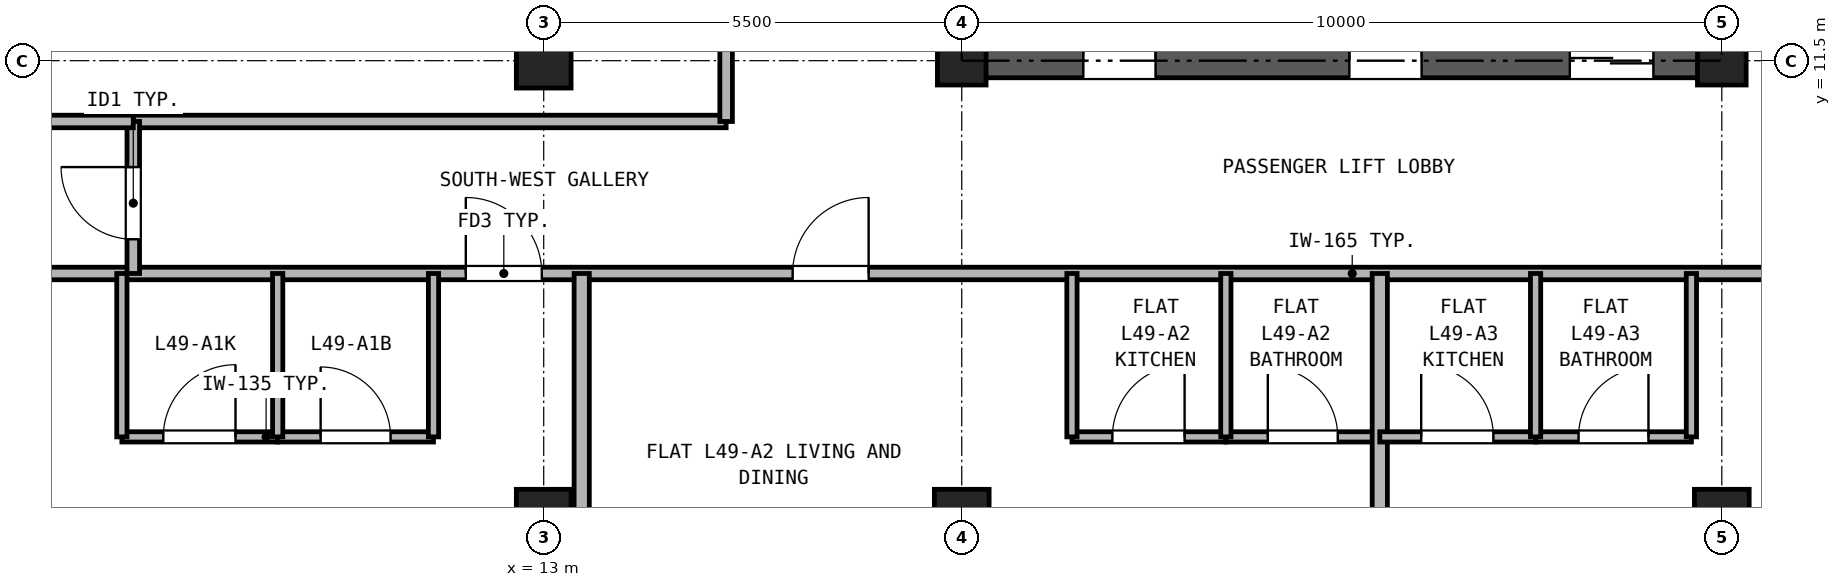
"""IFC4 building model, lengths in metres.
Left out: names, types, materials, properties, quantities, classifications, styles, units other than length and angle.
Written with IfcOpenShell. Run it as: python <this file> out.ifc"""

import sys

from ifc_helpers import new_model, si_unit, direction, frame, frame_2d, origin, origin_2d, place, context, subcontext, project, spatial, rectangle, hollow_rectangle, extrude, source, transform, mapped, element, fill, save


model = new_model("IFC4")
c1 = context("Model", 3, precision=1e-05, world=origin(), true_north=direction((0.0, 1.0)))
c2 = subcontext(c1, "Body", "Model", "MODEL_VIEW")
j1 = project(units=[si_unit("LENGTHUNIT", "METRE"), si_unit("PLANEANGLEUNIT", "RADIAN")], contexts=[c1])
p1 = place(None, origin())
s1 = spatial("IfcSite", under=j1, at=p1, CompositionType="ELEMENT")
p2 = place(p1, origin())
s2 = spatial("IfcBuilding", under=s1, at=p2, CompositionType="ELEMENT")
p3 = place(p2, frame((0.0, 0.0, 175.3)))
s3 = spatial("IfcBuildingStorey", under=s2, at=p3, CompositionType="ELEMENT", Elevation=175.3)
m1 = source(origin(), c2, "Body", "SweptSolid", [
    extrude(hollow_rectangle(XDim=0.72, YDim=0.72, WallThickness=0.04, at=origin_2d()), origin(), (0.0, 0.0, 1.0), 2.95),
])
for number, where, z_axis, x_axis in (
    (1, (13.0, 5.5, 0.0), (0.0, 0.0, 1.0), (1.0, 0.0, 0.0)),
    (2, (13.0, 11.5, 0.0), (0.0, 0.0, 1.0), (1.0, 0.0, 0.0)),
    (3, (18.5, 5.5, 0.0), (0.0, 0.0, 1.0), (1.0, 0.0, 0.0)),
):
    element("IfcColumn", number, at=place(p3, frame(where, z_axis=z_axis, x_axis=x_axis)), inside=s3, PredefinedType="COLUMN", context=c2, shape_type="MappedRepresentation", body=[
        mapped(m1, transform((0.0, 0.0, 0.0), x_axis=(1.0, 0.0, 0.0), y_axis=(0.0, 1.0, 0.0), z_axis=(0.0, 0.0, 1.0), scale=1.0)),
    ])
m2 = source(origin(), c2, "Body", "SweptSolid", [
    extrude(hollow_rectangle(XDim=0.64, YDim=0.64, WallThickness=0.035, at=origin_2d()), origin(), (0.0, 0.0, 1.0), 2.95),
])
p4 = place(p3, frame((18.5, 11.5, 0.0), z_axis=(0.0, 0.0, 1.0), x_axis=(1.0, 0.0, 0.0)))
e4 = element("IfcColumn", 4, at=p4, inside=s3, PredefinedType="COLUMN", context=c2, shape_type="MappedRepresentation", body=[
    mapped(m2, transform((0.0, 0.0, 0.0), x_axis=(1.0, 0.0, 0.0), y_axis=(0.0, 1.0, 0.0), z_axis=(0.0, 0.0, 1.0), scale=1.0)),
])
p5 = place(p3, frame((28.5, 5.5, 0.0), z_axis=(0.0, 0.0, 1.0), x_axis=(1.0, 0.0, 0.0)))
e5 = element("IfcColumn", 5, at=p5, inside=s3, PredefinedType="COLUMN", context=c2, shape_type="MappedRepresentation", body=[
    mapped(m1, transform((0.0, 0.0, 0.0), x_axis=(1.0, 0.0, 0.0), y_axis=(0.0, 1.0, 0.0), z_axis=(0.0, 0.0, 1.0), scale=1.0)),
])
p6 = place(p3, frame((28.5, 11.5, 0.0), z_axis=(0.0, 0.0, 1.0), x_axis=(1.0, 0.0, 0.0)))
e6 = element("IfcColumn", 6, at=p6, inside=s3, PredefinedType="COLUMN", context=c2, shape_type="MappedRepresentation", body=[
    mapped(m2, transform((0.0, 0.0, 0.0), x_axis=(1.0, 0.0, 0.0), y_axis=(0.0, 1.0, 0.0), z_axis=(0.0, 0.0, 1.0), scale=1.0)),
])
p7 = place(p3, frame((18.275, 11.5, 0.0), z_axis=(0.0, 0.0, 1.0), x_axis=(1.0, 0.0, 0.0)))
e7 = element("IfcWall", 7, at=p7, inside=s3, PredefinedType="SHEAR", context=c2, shape_type="SweptSolid", body=[
    extrude(rectangle(XDim=10.45, YDim=0.45, at=frame_2d((5.225, 0.0))), origin(), (0.0, 0.0, 1.0), 2.95),
])
p8 = place(p7, frame((1.825, 0.0, 0.0)))
e8 = element("IfcOpeningElement", 8, at=p8, cuts=e7, PredefinedType="OPENING", context=c2, shape_type="SweptSolid", body=[
    extrude(rectangle(XDim=0.95, YDim=2.15, at=frame_2d((0.475, 1.075))), frame((0.0, 0.235, 0.0), z_axis=(0.0, -1.0, 0.0), x_axis=(1.0, 0.0, 0.0)), (0.0, 0.0, 1.0), 0.47),
])
p9 = place(p7, frame((5.325, 0.0, 0.0)))
e9 = element("IfcOpeningElement", 9, at=p9, cuts=e7, PredefinedType="OPENING", context=c2, shape_type="SweptSolid", body=[
    extrude(rectangle(XDim=0.95, YDim=2.15, at=frame_2d((0.475, 1.075))), frame((0.0, 0.235, 0.0), z_axis=(0.0, -1.0, 0.0), x_axis=(1.0, 0.0, 0.0)), (0.0, 0.0, 1.0), 0.47),
])
p10 = place(p7, frame((8.225, 0.0, 0.0)))
e10 = element("IfcOpeningElement", 10, at=p10, cuts=e7, PredefinedType="OPENING", context=c2, shape_type="SweptSolid", body=[
    extrude(rectangle(XDim=1.1, YDim=2.25, at=frame_2d((0.55, 1.125))), frame((0.0, 0.235, 0.0), z_axis=(0.0, -1.0, 0.0), x_axis=(1.0, 0.0, 0.0)), (0.0, 0.0, 1.0), 0.47),
])
p11 = place(p3, frame((0.16, 8.7, 0.0), z_axis=(0.0, 0.0, 1.0), x_axis=(1.0, 0.0, 0.0)))
e11 = element("IfcWall", 11, at=p11, inside=s3, PredefinedType="PARTITIONING", context=c2, shape_type="SweptSolid", body=[
    extrude(rectangle(XDim=41.48, YDim=0.165, at=frame_2d((20.74, 0.0))), origin(), (0.0, 0.0, 1.0), 2.583),
])
p12 = place(p11, frame((11.815, 0.0, 0.0)))
e12 = element("IfcOpeningElement", 12, at=p12, cuts=e11, PredefinedType="OPENING", context=c2, shape_type="SweptSolid", body=[
    extrude(rectangle(XDim=1.0, YDim=2.15, at=frame_2d((0.5, 1.075))), frame((0.0, 0.093, 0.0), z_axis=(0.0, -1.0, 0.0), x_axis=(1.0, 0.0, 0.0)), (0.0, 0.0, 1.0), 0.185),
])
p13 = place(p11, frame((16.115, 0.0, 0.0)))
e13 = element("IfcOpeningElement", 13, at=p13, cuts=e11, PredefinedType="OPENING", context=c2, shape_type="SweptSolid", body=[
    extrude(rectangle(XDim=1.0, YDim=2.15, at=frame_2d((0.5, 1.075))), frame((0.0, 0.093, 0.0), z_axis=(0.0, -1.0, 0.0), x_axis=(1.0, 0.0, 0.0)), (0.0, 0.0, 1.0), 0.185),
])
p14 = place(p11, frame((29.84, 0.0, 0.0)))
e14 = element("IfcOpeningElement", 14, at=p14, cuts=e11, PredefinedType="OPENING", context=c2, shape_type="SweptSolid", body=[
    extrude(rectangle(XDim=1.0, YDim=2.15, at=frame_2d((0.5, 1.075))), frame((0.0, 0.093, 0.0), z_axis=(0.0, -1.0, 0.0), x_axis=(1.0, 0.0, 0.0)), (0.0, 0.0, 1.0), 0.185),
])
p15 = place(p11, frame((33.615, 0.0, 0.0)))
e15 = element("IfcOpeningElement", 15, at=p15, cuts=e11, PredefinedType="OPENING", context=c2, shape_type="SweptSolid", body=[
    extrude(rectangle(XDim=1.0, YDim=2.15, at=frame_2d((0.5, 1.075))), frame((0.0, 0.093, 0.0), z_axis=(0.0, -1.0, 0.0), x_axis=(1.0, 0.0, 0.0)), (0.0, 0.0, 1.0), 0.185),
])
p16 = place(p3, frame((7.6, 10.7, 0.0), z_axis=(0.0, 0.0, 1.0), x_axis=(1.0, 0.0, 0.0)))
e16 = element("IfcWall", 16, at=p16, inside=s3, PredefinedType="PARTITIONING", context=c2, shape_type="SweptSolid", body=[
    extrude(rectangle(XDim=7.8, YDim=0.165, at=frame_2d((3.9, 0.0))), origin(), (0.0, 0.0, 1.0), 2.95),
])
p17 = place(p3, frame((7.6, 8.7, 0.0), z_axis=(0.0, 0.0, 1.0), x_axis=(0.0, 1.0, 0.0)))
e17 = element("IfcWall", 17, at=p17, inside=s3, PredefinedType="PARTITIONING", context=c2, shape_type="SweptSolid", body=[
    extrude(rectangle(XDim=2.0, YDim=0.165, at=frame_2d((1.0, 0.0))), origin(), (0.0, 0.0, 1.0), 2.95),
])
p18 = place(p17, frame((0.45, 0.0, 0.0)))
e18 = element("IfcOpeningElement", 18, at=p18, cuts=e17, PredefinedType="OPENING", context=c2, shape_type="SweptSolid", body=[
    extrude(rectangle(XDim=0.95, YDim=2.15, at=frame_2d((0.475, 1.075))), frame((0.0, 0.093, 0.0), z_axis=(0.0, -1.0, 0.0), x_axis=(1.0, 0.0, 0.0)), (0.0, 0.0, 1.0), 0.185),
])
p19 = place(p3, frame((15.4, 10.7, 0.0), z_axis=(0.0, 0.0, 1.0), x_axis=(0.0, 1.0, 0.0)))
e19 = element("IfcWall", 19, at=p19, inside=s3, PredefinedType="PARTITIONING", context=c2, shape_type="SweptSolid", body=[
    extrude(rectangle(XDim=24.44, YDim=0.165, at=frame_2d((12.22, 0.0))), origin(), (0.0, 0.0, 1.0), 2.95),
])
p20 = place(p19, frame((4.9, 0.0, 0.0)))
e20 = element("IfcOpeningElement", 20, at=p20, cuts=e19, PredefinedType="OPENING", context=c2, shape_type="SweptSolid", body=[
    extrude(rectangle(XDim=0.95, YDim=2.15, at=frame_2d((0.475, 1.075))), frame((0.0, 0.093, 0.0), z_axis=(0.0, -1.0, 0.0), x_axis=(1.0, 0.0, 0.0)), (0.0, 0.0, 1.0), 0.185),
])
p21 = place(p19, frame((13.8, 0.0, 0.0)))
e21 = element("IfcOpeningElement", 21, at=p21, cuts=e19, PredefinedType="OPENING", context=c2, shape_type="SweptSolid", body=[
    extrude(rectangle(XDim=0.95, YDim=2.15, at=frame_2d((0.475, 1.075))), frame((0.0, 0.093, 0.0), z_axis=(0.0, -1.0, 0.0), x_axis=(1.0, 0.0, 0.0)), (0.0, 0.0, 1.0), 0.185),
])
p22 = place(p19, frame((18.7, 0.0, 0.0)))
e22 = element("IfcOpeningElement", 22, at=p22, cuts=e19, PredefinedType="OPENING", context=c2, shape_type="SweptSolid", body=[
    extrude(rectangle(XDim=0.95, YDim=2.15, at=frame_2d((0.475, 1.075))), frame((0.0, 0.093, 0.0), z_axis=(0.0, -1.0, 0.0), x_axis=(1.0, 0.0, 0.0)), (0.0, 0.0, 1.0), 0.185),
])
p23 = place(p3, frame((7.45, 6.55, 0.0), z_axis=(0.0, 0.0, 1.0), x_axis=(1.0, 0.0, 0.0)))
e23 = element("IfcWall", 23, at=p23, inside=s3, PredefinedType="PARTITIONING", context=c2, shape_type="SweptSolid", body=[
    extrude(rectangle(XDim=2.05, YDim=0.135, at=frame_2d((1.025, 0.0))), origin(), (0.0, 0.0, 1.0), 2.95),
])
p24 = place(p23, frame((0.545, 0.0, 0.0)))
e24 = element("IfcOpeningElement", 24, at=p24, cuts=e23, PredefinedType="OPENING", context=c2, shape_type="SweptSolid", body=[
    extrude(rectangle(XDim=0.95, YDim=2.15, at=frame_2d((0.475, 1.075))), frame((0.0, 0.077, 0.0), z_axis=(0.0, -1.0, 0.0), x_axis=(1.0, 0.0, 0.0)), (0.0, 0.0, 1.0), 0.155),
])
p25 = place(p3, frame((9.5, 6.55, 0.0), z_axis=(0.0, 0.0, 1.0), x_axis=(1.0, 0.0, 0.0)))
e25 = element("IfcWall", 25, at=p25, inside=s3, PredefinedType="PARTITIONING", context=c2, shape_type="SweptSolid", body=[
    extrude(rectangle(XDim=2.05, YDim=0.135, at=frame_2d((1.025, 0.0))), origin(), (0.0, 0.0, 1.0), 2.95),
])
p26 = place(p25, frame((0.565, 0.0, 0.0)))
e26 = element("IfcOpeningElement", 26, at=p26, cuts=e25, PredefinedType="OPENING", context=c2, shape_type="SweptSolid", body=[
    extrude(rectangle(XDim=0.92, YDim=2.1, at=frame_2d((0.46, 1.05))), frame((0.0, 0.077, 0.0), z_axis=(0.0, -1.0, 0.0), x_axis=(1.0, 0.0, 0.0)), (0.0, 0.0, 1.0), 0.155),
])
for number, where, z_axis, x_axis in (
    (27, (7.45, 6.55, 0.0), (0.0, 0.0, 1.0), (0.0, 1.0, 0.0)),
    (28, (9.5, 6.55, 0.0), (0.0, 0.0, 1.0), (0.0, 1.0, 0.0)),
    (29, (11.55, 6.55, 0.0), (0.0, 0.0, 1.0), (0.0, 1.0, 0.0)),
):
    element("IfcWall", number, at=place(p3, frame(where, z_axis=z_axis, x_axis=x_axis)), inside=s3, PredefinedType="PARTITIONING", context=c2, shape_type="SweptSolid", body=[
        extrude(rectangle(XDim=2.15, YDim=0.135, at=frame_2d((1.075, 0.0))), origin(), (0.0, 0.0, 1.0), 2.95),
    ])
p27 = place(p3, frame((13.5, 0.16, 0.0), z_axis=(0.0, 0.0, 1.0), x_axis=(0.0, 1.0, 0.0)))
e30 = element("IfcWall", 30, at=p27, inside=s3, PredefinedType="PARTITIONING", context=c2, shape_type="SweptSolid", body=[
    extrude(rectangle(XDim=8.54, YDim=0.2, at=frame_2d((4.27, 0.0))), origin(), (0.0, 0.0, 1.0), 2.95),
])
p28 = place(p3, frame((19.95, 6.55, 0.0), z_axis=(0.0, 0.0, 1.0), x_axis=(1.0, 0.0, 0.0)))
e31 = element("IfcWall", 31, at=p28, inside=s3, PredefinedType="PARTITIONING", context=c2, shape_type="SweptSolid", body=[
    extrude(rectangle(XDim=2.025, YDim=0.135, at=frame_2d((1.013, 0.0))), origin(), (0.0, 0.0, 1.0), 2.95),
])
p29 = place(p28, frame((0.532, 0.0, 0.0)))
e32 = element("IfcOpeningElement", 32, at=p29, cuts=e31, PredefinedType="OPENING", context=c2, shape_type="SweptSolid", body=[
    extrude(rectangle(XDim=0.95, YDim=2.15, at=frame_2d((0.475, 1.075))), frame((0.0, 0.077, 0.0), z_axis=(0.0, -1.0, 0.0), x_axis=(1.0, 0.0, 0.0)), (0.0, 0.0, 1.0), 0.155),
])
p30 = place(p3, frame((21.975, 6.55, 0.0), z_axis=(0.0, 0.0, 1.0), x_axis=(1.0, 0.0, 0.0)))
e33 = element("IfcWall", 33, at=p30, inside=s3, PredefinedType="PARTITIONING", context=c2, shape_type="SweptSolid", body=[
    extrude(rectangle(XDim=2.025, YDim=0.135, at=frame_2d((1.012, 0.0))), origin(), (0.0, 0.0, 1.0), 2.95),
])
p31 = place(p30, frame((0.552, 0.0, 0.0)))
e34 = element("IfcOpeningElement", 34, at=p31, cuts=e33, PredefinedType="OPENING", context=c2, shape_type="SweptSolid", body=[
    extrude(rectangle(XDim=0.92, YDim=2.1, at=frame_2d((0.46, 1.05))), frame((0.0, 0.077, 0.0), z_axis=(0.0, -1.0, 0.0), x_axis=(1.0, 0.0, 0.0)), (0.0, 0.0, 1.0), 0.155),
])
for number, where, z_axis, x_axis in (
    (35, (19.95, 6.55, 0.0), (0.0, 0.0, 1.0), (0.0, 1.0, 0.0)),
    (36, (21.975, 6.55, 0.0), (0.0, 0.0, 1.0), (0.0, 1.0, 0.0)),
):
    element("IfcWall", number, at=place(p3, frame(where, z_axis=z_axis, x_axis=x_axis)), inside=s3, PredefinedType="PARTITIONING", context=c2, shape_type="SweptSolid", body=[
        extrude(rectangle(XDim=2.15, YDim=0.135, at=frame_2d((1.075, 0.0))), origin(), (0.0, 0.0, 1.0), 2.95),
    ])
p32 = place(p3, frame((24.0, 0.16, 0.0), z_axis=(0.0, 0.0, 1.0), x_axis=(0.0, 1.0, 0.0)))
e37 = element("IfcWall", 37, at=p32, inside=s3, PredefinedType="PARTITIONING", context=c2, shape_type="SweptSolid", body=[
    extrude(rectangle(XDim=8.54, YDim=0.2, at=frame_2d((4.27, 0.0))), origin(), (0.0, 0.0, 1.0), 2.95),
])
p33 = place(p3, frame((24.0, 6.55, 0.0), z_axis=(0.0, 0.0, 1.0), x_axis=(1.0, 0.0, 0.0)))
e38 = element("IfcWall", 38, at=p33, inside=s3, PredefinedType="PARTITIONING", context=c2, shape_type="SweptSolid", body=[
    extrude(rectangle(XDim=2.05, YDim=0.135, at=frame_2d((1.025, 0.0))), origin(), (0.0, 0.0, 1.0), 2.95),
])
p34 = place(p33, frame((0.545, 0.0, 0.0)))
e39 = element("IfcOpeningElement", 39, at=p34, cuts=e38, PredefinedType="OPENING", context=c2, shape_type="SweptSolid", body=[
    extrude(rectangle(XDim=0.95, YDim=2.15, at=frame_2d((0.475, 1.075))), frame((0.0, 0.077, 0.0), z_axis=(0.0, -1.0, 0.0), x_axis=(1.0, 0.0, 0.0)), (0.0, 0.0, 1.0), 0.155),
])
p35 = place(p3, frame((26.05, 6.55, 0.0), z_axis=(0.0, 0.0, 1.0), x_axis=(1.0, 0.0, 0.0)))
e40 = element("IfcWall", 40, at=p35, inside=s3, PredefinedType="PARTITIONING", context=c2, shape_type="SweptSolid", body=[
    extrude(rectangle(XDim=2.05, YDim=0.135, at=frame_2d((1.025, 0.0))), origin(), (0.0, 0.0, 1.0), 2.95),
])
p36 = place(p35, frame((0.565, 0.0, 0.0)))
e41 = element("IfcOpeningElement", 41, at=p36, cuts=e40, PredefinedType="OPENING", context=c2, shape_type="SweptSolid", body=[
    extrude(rectangle(XDim=0.92, YDim=2.1, at=frame_2d((0.46, 1.05))), frame((0.0, 0.077, 0.0), z_axis=(0.0, -1.0, 0.0), x_axis=(1.0, 0.0, 0.0)), (0.0, 0.0, 1.0), 0.155),
])
for number, where, z_axis, x_axis in (
    (42, (26.05, 6.55, 0.0), (0.0, 0.0, 1.0), (0.0, 1.0, 0.0)),
    (43, (28.1, 6.55, 0.0), (0.0, 0.0, 1.0), (0.0, 1.0, 0.0)),
):
    element("IfcWall", number, at=place(p3, frame(where, z_axis=z_axis, x_axis=x_axis)), inside=s3, PredefinedType="PARTITIONING", context=c2, shape_type="SweptSolid", body=[
        extrude(rectangle(XDim=2.15, YDim=0.135, at=frame_2d((1.075, 0.0))), origin(), (0.0, 0.0, 1.0), 2.95),
    ])
p37 = place(p3, frame((0.16, 10.7, 0.0), z_axis=(0.0, 0.0, 1.0), x_axis=(1.0, 0.0, 0.0)))
e44 = element("IfcWall", 44, at=p37, inside=s3, PredefinedType="PARTITIONING", context=c2, shape_type="SweptSolid", body=[
    extrude(rectangle(XDim=7.44, YDim=0.165, at=frame_2d((3.72, 0.0))), origin(), (0.0, 0.0, 1.0), 2.95),
])
p38 = place(p8, frame((0.95, 0.0, 0.0), z_axis=(0.0, 0.0, 1.0), x_axis=(-1.0, 0.0, 0.0)))
e45 = element("IfcDoor", 45, at=p38, inside=s3, OperationType="SINGLE_SWING_RIGHT", PredefinedType="DOOR", context=c2, shape_type="SweptSolid", body=[
    extrude(rectangle(XDim=0.95, YDim=2.15, at=frame_2d((0.475, 1.075))), frame((0.0, 0.025, 0.0), z_axis=(0.0, -1.0, 0.0), x_axis=(1.0, 0.0, 0.0)), (0.0, 0.0, 1.0), 0.05),
])
fill(e8, e45)
p39 = place(p9, frame((0.95, 0.0, 0.0), z_axis=(0.0, 0.0, 1.0), x_axis=(-1.0, 0.0, 0.0)))
e46 = element("IfcDoor", 46, at=p39, inside=s3, OperationType="SINGLE_SWING_LEFT", PredefinedType="DOOR", context=c2, shape_type="SweptSolid", body=[
    extrude(rectangle(XDim=0.95, YDim=2.15, at=frame_2d((0.475, 1.075))), frame((0.0, 0.025, 0.0), z_axis=(0.0, -1.0, 0.0), x_axis=(1.0, 0.0, 0.0)), (0.0, 0.0, 1.0), 0.05),
])
fill(e9, e46)
p40 = place(p10, frame((1.1, 0.0, 0.0), z_axis=(0.0, 0.0, 1.0), x_axis=(-1.0, 0.0, 0.0)))
e47 = element("IfcDoor", 47, at=p40, inside=s3, OperationType="DOUBLE_DOOR_SLIDING", PredefinedType="DOOR", context=c2, shape_type="SweptSolid", body=[
    extrude(rectangle(XDim=1.1, YDim=2.25, at=frame_2d((0.55, 1.125))), frame((0.0, 0.025, 0.0), z_axis=(0.0, -1.0, 0.0), x_axis=(1.0, 0.0, 0.0)), (0.0, 0.0, 1.0), 0.05),
])
fill(e10, e47)
p41 = place(p24, origin())
e48 = element("IfcDoor", 48, at=p41, inside=s3, OperationType="SINGLE_SWING_RIGHT", PredefinedType="DOOR", context=c2, shape_type="SweptSolid", body=[
    extrude(rectangle(XDim=0.95, YDim=2.15, at=frame_2d((0.475, 1.075))), frame((0.0, 0.025, 0.0), z_axis=(0.0, -1.0, 0.0), x_axis=(1.0, 0.0, 0.0)), (0.0, 0.0, 1.0), 0.05),
])
fill(e24, e48)
p42 = place(p26, origin())
e49 = element("IfcDoor", 49, at=p42, inside=s3, OperationType="SINGLE_SWING_LEFT", PredefinedType="DOOR", context=c2, shape_type="SweptSolid", body=[
    extrude(rectangle(XDim=0.92, YDim=2.1, at=frame_2d((0.46, 1.05))), frame((0.0, 0.025, 0.0), z_axis=(0.0, -1.0, 0.0), x_axis=(1.0, 0.0, 0.0)), (0.0, 0.0, 1.0), 0.05),
])
fill(e26, e49)
p43 = place(p12, frame((1.0, 0.0, 0.0), z_axis=(0.0, 0.0, 1.0), x_axis=(-1.0, 0.0, 0.0)))
e50 = element("IfcDoor", 50, at=p43, inside=s3, OperationType="SINGLE_SWING_LEFT", PredefinedType="DOOR", context=c2, shape_type="SweptSolid", body=[
    extrude(rectangle(XDim=1.0, YDim=2.15, at=frame_2d((0.5, 1.075))), frame((0.0, 0.025, 0.0), z_axis=(0.0, -1.0, 0.0), x_axis=(1.0, 0.0, 0.0)), (0.0, 0.0, 1.0), 0.05),
])
fill(e12, e50)
p44 = place(p29, origin())
e51 = element("IfcDoor", 51, at=p44, inside=s3, OperationType="SINGLE_SWING_RIGHT", PredefinedType="DOOR", context=c2, shape_type="SweptSolid", body=[
    extrude(rectangle(XDim=0.95, YDim=2.15, at=frame_2d((0.475, 1.075))), frame((0.0, 0.025, 0.0), z_axis=(0.0, -1.0, 0.0), x_axis=(1.0, 0.0, 0.0)), (0.0, 0.0, 1.0), 0.05),
])
fill(e32, e51)
p45 = place(p31, origin())
e52 = element("IfcDoor", 52, at=p45, inside=s3, OperationType="SINGLE_SWING_LEFT", PredefinedType="DOOR", context=c2, shape_type="SweptSolid", body=[
    extrude(rectangle(XDim=0.92, YDim=2.1, at=frame_2d((0.46, 1.05))), frame((0.0, 0.025, 0.0), z_axis=(0.0, -1.0, 0.0), x_axis=(1.0, 0.0, 0.0)), (0.0, 0.0, 1.0), 0.05),
])
fill(e34, e52)
p46 = place(p13, frame((1.0, 0.0, 0.0), z_axis=(0.0, 0.0, 1.0), x_axis=(-1.0, 0.0, 0.0)))
e53 = element("IfcDoor", 53, at=p46, inside=s3, OperationType="SINGLE_SWING_RIGHT", PredefinedType="DOOR", context=c2, shape_type="SweptSolid", body=[
    extrude(rectangle(XDim=1.0, YDim=2.15, at=frame_2d((0.5, 1.075))), frame((0.0, 0.025, 0.0), z_axis=(0.0, -1.0, 0.0), x_axis=(1.0, 0.0, 0.0)), (0.0, 0.0, 1.0), 0.05),
])
fill(e13, e53)
p47 = place(p34, origin())
e54 = element("IfcDoor", 54, at=p47, inside=s3, OperationType="SINGLE_SWING_LEFT", PredefinedType="DOOR", context=c2, shape_type="SweptSolid", body=[
    extrude(rectangle(XDim=0.95, YDim=2.15, at=frame_2d((0.475, 1.075))), frame((0.0, 0.025, 0.0), z_axis=(0.0, -1.0, 0.0), x_axis=(1.0, 0.0, 0.0)), (0.0, 0.0, 1.0), 0.05),
])
fill(e39, e54)
p48 = place(p36, origin())
e55 = element("IfcDoor", 55, at=p48, inside=s3, OperationType="SINGLE_SWING_RIGHT", PredefinedType="DOOR", context=c2, shape_type="SweptSolid", body=[
    extrude(rectangle(XDim=0.92, YDim=2.1, at=frame_2d((0.46, 1.05))), frame((0.0, 0.025, 0.0), z_axis=(0.0, -1.0, 0.0), x_axis=(1.0, 0.0, 0.0)), (0.0, 0.0, 1.0), 0.05),
])
fill(e41, e55)
p49 = place(p18, frame((0.95, 0.0, 0.0), z_axis=(0.0, 0.0, 1.0), x_axis=(-1.0, 0.0, 0.0)))
e56 = element("IfcDoor", 56, at=p49, inside=s3, OperationType="SINGLE_SWING_RIGHT", PredefinedType="DOOR", context=c2, shape_type="SweptSolid", body=[
    extrude(rectangle(XDim=0.95, YDim=2.15, at=frame_2d((0.475, 1.075))), frame((0.0, 0.025, 0.0), z_axis=(0.0, -1.0, 0.0), x_axis=(1.0, 0.0, 0.0)), (0.0, 0.0, 1.0), 0.05),
])
fill(e18, e56)
save(model, sys.argv[1])
